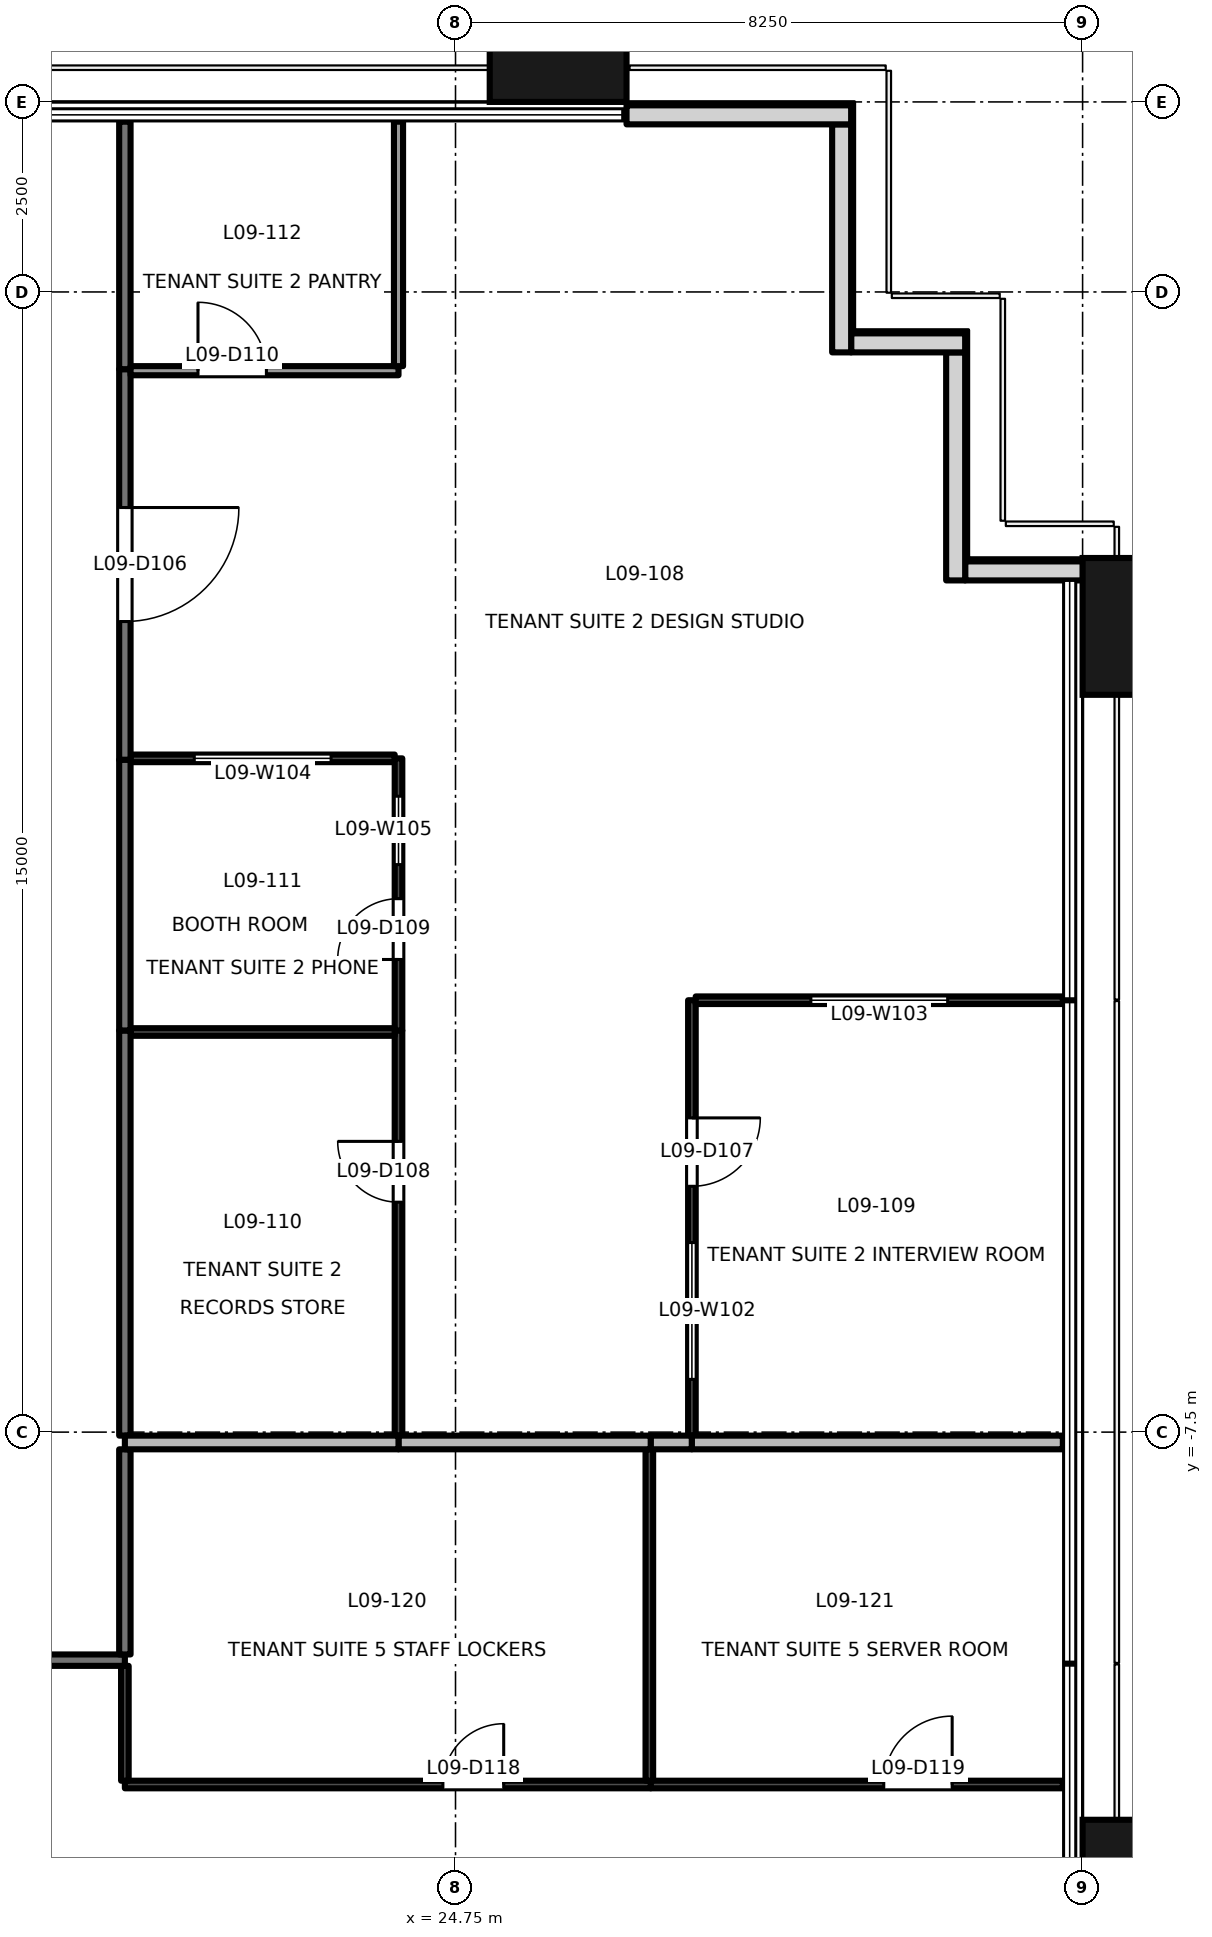
"""IFC4 building model, lengths in metres.
Left out: names, types, materials, properties, quantities, classifications, styles, units other than length and angle.
Written with IfcOpenShell. Run it as: python <this file> out.ifc"""

import sys

from ifc_helpers import new_model, si_unit, direction, frame, frame_2d, origin, origin_2d, place, context, subcontext, project, spatial, rectangle, extrude, element, fill, save


model = new_model("IFC4")
c1 = context("Model", 3, precision=1e-05, world=origin(), true_north=direction((0.0, 1.0)))
c2 = subcontext(c1, "Body", "Model", "MODEL_VIEW")
j1 = project(units=[si_unit("LENGTHUNIT", "METRE"), si_unit("PLANEANGLEUNIT", "RADIAN")], contexts=[c1])
p1 = place(None, origin())
s1 = spatial("IfcSite", under=j1, at=p1, CompositionType="ELEMENT")
p2 = place(p1, origin())
s2 = spatial("IfcBuilding", under=s1, at=p2, CompositionType="ELEMENT")
p3 = place(p2, frame((0.0, 0.0, 44.7)))
s3 = spatial("IfcBuildingStorey", under=s2, at=p3, CompositionType="ELEMENT", Elevation=44.7)
for number, where, z_axis, x_axis in (
    (1, (33.9, -13.5, -0.2), (0.0, 0.0, 1.0), (0.0, 1.0, 0.0)),
    (2, (33.9, 3.1, -0.2), (0.0, 0.0, 1.0), (0.0, 1.0, 0.0)),
    (3, (26.1, 10.9, -0.2), (0.0, 0.0, 1.0), (1.0, 0.0, 0.0)),
):
    element("IfcColumn", number, at=place(p3, frame(where, z_axis=z_axis, x_axis=x_axis)), inside=s3, PredefinedType="COLUMN", context=c2, shape_type="SweptSolid", body=[
        extrude(rectangle(XDim=1.8, YDim=1.8, at=origin_2d()), origin(), (0.0, 0.0, 1.0), 4.1),
    ])
p4 = place(p3, frame((33.005, 3.83, 0.0), z_axis=(0.0, 0.0, 1.0), x_axis=(-1.0, 0.0, 0.0)))
e4 = element("IfcWall", 4, at=p4, inside=s3, PredefinedType="SOLIDWALL", context=c2, shape_type="SweptSolid", body=[
    extrude(rectangle(XDim=1.55, YDim=0.25, at=frame_2d((0.775, 0.0))), origin(), (0.0, 0.0, 1.0), 3.9),
])
p5 = place(p3, frame((31.33, 3.705, 0.0), z_axis=(0.0, 0.0, 1.0), x_axis=(0.0, 1.0, 0.0)))
e5 = element("IfcWall", 5, at=p5, inside=s3, PredefinedType="SOLIDWALL", context=c2, shape_type="SweptSolid", body=[
    extrude(rectangle(XDim=3.0, YDim=0.25, at=frame_2d((1.5, 0.0))), origin(), (0.0, 0.0, 1.0), 3.9),
])
p6 = place(p3, frame((31.455, 6.83, 0.0), z_axis=(0.0, 0.0, 1.0), x_axis=(-1.0, 0.0, 0.0)))
e6 = element("IfcWall", 6, at=p6, inside=s3, PredefinedType="SOLIDWALL", context=c2, shape_type="SweptSolid", body=[
    extrude(rectangle(XDim=1.5, YDim=0.25, at=frame_2d((0.75, 0.0))), origin(), (0.0, 0.0, 1.0), 3.9),
])
p7 = place(p3, frame((29.83, 6.705, 0.0), z_axis=(0.0, 0.0, 1.0), x_axis=(0.0, 1.0, 0.0)))
e7 = element("IfcWall", 7, at=p7, inside=s3, PredefinedType="SOLIDWALL", context=c2, shape_type="SweptSolid", body=[
    extrude(rectangle(XDim=3.0, YDim=0.25, at=frame_2d((1.5, 0.0))), origin(), (0.0, 0.0, 1.0), 3.9),
])
p8 = place(p3, frame((29.955, 9.83, 0.0), z_axis=(0.0, 0.0, 1.0), x_axis=(-1.0, 0.0, 0.0)))
e8 = element("IfcWall", 8, at=p8, inside=s3, PredefinedType="SOLIDWALL", context=c2, shape_type="SweptSolid", body=[
    extrude(rectangle(XDim=2.955, YDim=0.25, at=frame_2d((1.478, 0.0))), origin(), (0.0, 0.0, 1.0), 3.9),
])
p9 = place(p3, frame((20.4, 6.484, 0.0), z_axis=(0.0, 0.0, 1.0), x_axis=(0.0, -1.0, 0.0)))
e9 = element("IfcWall", 9, at=p9, inside=s3, PredefinedType="PARTITIONING", context=c2, shape_type="SweptSolid", body=[
    extrude(rectangle(XDim=5.14, YDim=0.15, at=frame_2d((2.57, 0.0))), origin(), (0.0, 0.0, 1.0), 3.9),
])
p10 = place(p9, frame((1.82, 0.0, 0.0)))
e10 = element("IfcOpeningElement", 10, at=p10, cuts=e9, PredefinedType="OPENING", context=c2, shape_type="SweptSolid", body=[
    extrude(rectangle(XDim=1.5, YDim=2.1, at=frame_2d((0.75, 1.05))), frame((0.0, 0.085, 0.0), z_axis=(0.0, -1.0, 0.0), x_axis=(1.0, 0.0, 0.0)), (0.0, 0.0, 1.0), 0.171),
])
p11 = place(p3, frame((20.4, -2.216, 0.0), z_axis=(0.0, 0.0, 1.0), x_axis=(0.0, -1.0, 0.0)))
e11 = element("IfcWall", 11, at=p11, inside=s3, PredefinedType="PARTITIONING", context=c2, shape_type="SweptSolid", body=[
    extrude(rectangle(XDim=5.33, YDim=0.15, at=frame_2d((2.665, 0.0))), origin(), (0.0, 0.0, 1.0), 3.3),
])
p12 = place(p3, frame((20.4, 1.344, 0.0), z_axis=(0.0, 0.0, 1.0), x_axis=(0.0, -1.0, 0.0)))
e12 = element("IfcWall", 12, at=p12, inside=s3, PredefinedType="PARTITIONING", context=c2, shape_type="SweptSolid", body=[
    extrude(rectangle(XDim=3.56, YDim=0.15, at=frame_2d((1.78, 0.0))), origin(), (0.0, 0.0, 1.0), 3.3),
])
p13 = place(p3, frame((20.4, 9.74, 0.0), z_axis=(0.0, 0.0, 1.0), x_axis=(0.0, -1.0, 0.0)))
e13 = element("IfcWall", 13, at=p13, inside=s3, PredefinedType="PARTITIONING", context=c2, shape_type="SweptSolid", body=[
    extrude(rectangle(XDim=3.256, YDim=0.15, at=frame_2d((1.628, 0.0))), origin(), (0.0, 0.0, 1.0), 3.9),
])
p14 = place(p3, frame((20.4, -10.5, 0.0), z_axis=(0.0, 0.0, 1.0), x_axis=(-1.0, 0.0, 0.0)))
e14 = element("IfcWall", 14, at=p14, inside=s3, PredefinedType="PARTITIONING", context=c2, shape_type="SweptSolid", body=[
    extrude(rectangle(XDim=14.31, YDim=0.15, at=frame_2d((7.155, 0.0))), origin(), (0.0, 0.0, 1.0), 2.5),
])
p15 = place(p14, frame((3.252, 0.0, 0.0)))
e15 = element("IfcOpeningElement", 15, at=p15, cuts=e14, PredefinedType="OPENING", context=c2, shape_type="SweptSolid", body=[
    extrude(rectangle(XDim=1.8, YDim=2.1, at=frame_2d((0.9, 1.05))), frame((0.0, 0.085, 0.0), z_axis=(0.0, -1.0, 0.0), x_axis=(1.0, 0.0, 0.0)), (0.0, 0.0, 1.0), 0.171),
])
p16 = place(p3, frame((20.4, -7.726, 0.0), z_axis=(0.0, 0.0, 1.0), x_axis=(0.0, -1.0, 0.0)))
e16 = element("IfcWall", 16, at=p16, inside=s3, PredefinedType="PARTITIONING", context=c2, shape_type="SweptSolid", body=[
    extrude(rectangle(XDim=2.699, YDim=0.15, at=frame_2d((1.35, 0.0))), origin(), (0.0, 0.0, 1.0), 3.3),
])
p17 = place(p3, frame((27.86, -1.818, 0.0), z_axis=(0.0, 0.0, 1.0), x_axis=(0.0, -1.0, 0.0)))
e17 = element("IfcWall", 17, at=p17, inside=s3, PredefinedType="PARTITIONING", context=c2, shape_type="SweptSolid", body=[
    extrude(rectangle(XDim=5.728, YDim=0.1, at=frame_2d((2.864, 0.0))), origin(), (0.0, 0.0, 1.0), 3.3),
])
p18 = place(p17, frame((1.548, 0.0, 0.0)))
e18 = element("IfcOpeningElement", 18, at=p18, cuts=e17, PredefinedType="OPENING", context=c2, shape_type="SweptSolid", body=[
    extrude(rectangle(XDim=0.9, YDim=2.1, at=frame_2d((0.45, 1.05))), frame((0.0, 0.061, 0.0), z_axis=(0.0, -1.0, 0.0), x_axis=(1.0, 0.0, 0.0)), (0.0, 0.0, 1.0), 0.121),
])
p19 = place(p17, frame((3.188, 0.0, 0.9)))
e19 = element("IfcOpeningElement", 19, at=p19, cuts=e17, PredefinedType="OPENING", context=c2, shape_type="SweptSolid", body=[
    extrude(rectangle(XDim=1.8, YDim=1.2, at=frame_2d((0.9, 0.6))), frame((0.0, 0.061, 0.0), z_axis=(0.0, -1.0, 0.0), x_axis=(1.0, 0.0, 0.0)), (0.0, 0.0, 1.0), 0.121),
])
p20 = place(p3, frame((32.74, -1.818, 0.0), z_axis=(0.0, 0.0, 1.0), x_axis=(-1.0, 0.0, 0.0)))
e20 = element("IfcWall", 20, at=p20, inside=s3, PredefinedType="PARTITIONING", context=c2, shape_type="SweptSolid", body=[
    extrude(rectangle(XDim=4.83, YDim=0.1, at=frame_2d((2.415, 0.0))), origin(), (0.0, 0.0, 1.0), 3.9),
])
p21 = place(p20, frame((1.515, 0.0, 0.9)))
e21 = element("IfcOpeningElement", 21, at=p21, cuts=e20, PredefinedType="OPENING", context=c2, shape_type="SweptSolid", body=[
    extrude(rectangle(XDim=1.8, YDim=1.2, at=frame_2d((0.9, 0.6))), frame((0.0, 0.061, 0.0), z_axis=(0.0, -1.0, 0.0), x_axis=(1.0, 0.0, 0.0)), (0.0, 0.0, 1.0), 0.121),
])
p22 = place(p3, frame((24.0, -7.546, 0.0), z_axis=(0.0, 0.0, 1.0), x_axis=(0.0, 1.0, 0.0)))
e22 = element("IfcWall", 22, at=p22, inside=s3, PredefinedType="PARTITIONING", context=c2, shape_type="SweptSolid", body=[
    extrude(rectangle(XDim=5.33, YDim=0.1, at=frame_2d((2.665, 0.0))), origin(), (0.0, 0.0, 1.0), 3.3),
])
p23 = place(p22, frame((3.071, 0.0, 0.0)))
e23 = element("IfcOpeningElement", 23, at=p23, cuts=e22, PredefinedType="OPENING", context=c2, shape_type="SweptSolid", body=[
    extrude(rectangle(XDim=0.8, YDim=2.1, at=frame_2d((0.4, 1.05))), frame((0.0, 0.061, 0.0), z_axis=(0.0, -1.0, 0.0), x_axis=(1.0, 0.0, 0.0)), (0.0, 0.0, 1.0), 0.121),
])
p24 = place(p3, frame((23.95, 1.364, 0.0), z_axis=(0.0, 0.0, 1.0), x_axis=(-1.0, 0.0, 0.0)))
e24 = element("IfcWall", 24, at=p24, inside=s3, PredefinedType="PARTITIONING", context=c2, shape_type="SweptSolid", body=[
    extrude(rectangle(XDim=3.475, YDim=0.1, at=frame_2d((1.737, 0.0))), origin(), (0.0, 0.0, 1.0), 3.9),
])
p25 = place(p24, frame((0.837, 0.0, 0.9)))
e25 = element("IfcOpeningElement", 25, at=p25, cuts=e24, PredefinedType="OPENING", context=c2, shape_type="SweptSolid", body=[
    extrude(rectangle(XDim=1.8, YDim=1.2, at=frame_2d((0.9, 0.6))), frame((0.0, 0.061, 0.0), z_axis=(0.0, -1.0, 0.0), x_axis=(1.0, 0.0, 0.0)), (0.0, 0.0, 1.0), 0.121),
])
p26 = place(p3, frame((24.0, -2.216, 0.0), z_axis=(0.0, 0.0, 1.0), x_axis=(0.0, 1.0, 0.0)))
e26 = element("IfcWall", 26, at=p26, inside=s3, PredefinedType="PARTITIONING", context=c2, shape_type="SweptSolid", body=[
    extrude(rectangle(XDim=3.58, YDim=0.1, at=frame_2d((1.79, 0.0))), origin(), (0.0, 0.0, 1.0), 3.3),
])
p27 = place(p26, frame((0.934, 0.0, 0.0)))
e27 = element("IfcOpeningElement", 27, at=p27, cuts=e26, PredefinedType="OPENING", context=c2, shape_type="SweptSolid", body=[
    extrude(rectangle(XDim=0.8, YDim=2.1, at=frame_2d((0.4, 1.05))), frame((0.0, 0.061, 0.0), z_axis=(0.0, -1.0, 0.0), x_axis=(1.0, 0.0, 0.0)), (0.0, 0.0, 1.0), 0.121),
])
p28 = place(p26, frame((2.182, 0.0, 0.9)))
e28 = element("IfcOpeningElement", 28, at=p28, cuts=e26, PredefinedType="OPENING", context=c2, shape_type="SweptSolid", body=[
    extrude(rectangle(XDim=0.9, YDim=1.2, at=frame_2d((0.45, 0.6))), frame((0.0, 0.061, 0.0), z_axis=(0.0, -1.0, 0.0), x_axis=(1.0, 0.0, 0.0)), (0.0, 0.0, 1.0), 0.121),
])
p29 = place(p3, frame((20.475, 6.464, 0.0), z_axis=(0.0, 0.0, 1.0), x_axis=(1.0, 0.0, 0.0)))
e29 = element("IfcWall", 29, at=p29, inside=s3, PredefinedType="PARTITIONING", context=c2, shape_type="SweptSolid", body=[
    extrude(rectangle(XDim=3.525, YDim=0.12, at=frame_2d((1.762, 0.0))), origin(), (0.0, 0.0, 1.0), 3.9),
])
p30 = place(p29, frame((0.887, 0.0, 0.0)))
e30 = element("IfcOpeningElement", 30, at=p30, cuts=e29, PredefinedType="OPENING", context=c2, shape_type="SweptSolid", body=[
    extrude(rectangle(XDim=0.9, YDim=2.1, at=frame_2d((0.45, 1.05))), frame((0.0, 0.071, 0.0), z_axis=(0.0, -1.0, 0.0), x_axis=(1.0, 0.0, 0.0)), (0.0, 0.0, 1.0), 0.141),
])
p31 = place(p3, frame((24.0, 6.524, 0.0), z_axis=(0.0, 0.0, 1.0), x_axis=(0.0, 1.0, 0.0)))
e31 = element("IfcWall", 31, at=p31, inside=s3, PredefinedType="PARTITIONING", context=c2, shape_type="SweptSolid", body=[
    extrude(rectangle(XDim=3.216, YDim=0.12, at=frame_2d((1.608, 0.0))), origin(), (0.0, 0.0, 1.0), 3.9),
])
p32 = place(p3, frame((27.32, -7.636, 0.0), z_axis=(0.0, 0.0, 1.0), x_axis=(-1.0, 0.0, 0.0)))
e32 = element("IfcWall", 32, at=p32, inside=s3, PredefinedType="PARTITIONING", context=c2, shape_type="SweptSolid", body=[
    extrude(rectangle(XDim=3.32, YDim=0.18, at=frame_2d((1.66, 0.0))), origin(), (0.0, 0.0, 1.0), 3.9),
])
p33 = place(p3, frame((27.86, -7.636, 0.0), z_axis=(0.0, 0.0, 1.0), x_axis=(-1.0, 0.0, 0.0)))
e33 = element("IfcWall", 33, at=p33, inside=s3, PredefinedType="PARTITIONING", context=c2, shape_type="SweptSolid", body=[
    extrude(rectangle(XDim=0.54, YDim=0.18, at=frame_2d((0.27, 0.0))), origin(), (0.0, 0.0, 1.0), 3.9),
])
p34 = place(p3, frame((32.74, -7.636, 0.0), z_axis=(0.0, 0.0, 1.0), x_axis=(-1.0, 0.0, 0.0)))
e34 = element("IfcWall", 34, at=p34, inside=s3, PredefinedType="PARTITIONING", context=c2, shape_type="SweptSolid", body=[
    extrude(rectangle(XDim=4.88, YDim=0.18, at=frame_2d((2.44, 0.0))), origin(), (0.0, 0.0, 1.0), 3.9),
])
p35 = place(p3, frame((20.475, -2.236, 0.0), z_axis=(0.0, 0.0, 1.0), x_axis=(1.0, 0.0, 0.0)))
e35 = element("IfcWall", 35, at=p35, inside=s3, PredefinedType="PARTITIONING", context=c2, shape_type="SweptSolid", body=[
    extrude(rectangle(XDim=3.475, YDim=0.1, at=frame_2d((1.737, 0.0))), origin(), (0.0, 0.0, 1.0), 3.9),
])
p36 = place(p3, frame((24.0, -7.636, 0.0), z_axis=(0.0, 0.0, 1.0), x_axis=(-1.0, 0.0, 0.0)))
e36 = element("IfcWall", 36, at=p36, inside=s3, PredefinedType="PARTITIONING", context=c2, shape_type="SweptSolid", body=[
    extrude(rectangle(XDim=3.6, YDim=0.18, at=frame_2d((1.8, 0.0))), origin(), (0.0, 0.0, 1.0), 3.9),
])
p37 = place(p3, frame((20.4, -12.136, 0.0), z_axis=(0.0, 0.0, 1.0), x_axis=(1.0, 0.0, 0.0)))
e37 = element("IfcWall", 37, at=p37, inside=s3, PredefinedType="PARTITIONING", context=c2, shape_type="SweptSolid", body=[
    extrude(rectangle(XDim=6.92, YDim=0.1, at=frame_2d((3.46, 0.0))), origin(), (0.0, 0.0, 1.0), 3.9),
])
p38 = place(p37, frame((4.184, 0.0, 0.0)))
e38 = element("IfcOpeningElement", 38, at=p38, cuts=e37, PredefinedType="OPENING", context=c2, shape_type="SweptSolid", body=[
    extrude(rectangle(XDim=0.8, YDim=2.1, at=frame_2d((0.4, 1.05))), frame((0.0, 0.061, 0.0), z_axis=(0.0, -1.0, 0.0), x_axis=(1.0, 0.0, 0.0)), (0.0, 0.0, 1.0), 0.121),
])
p39 = place(p3, frame((20.4, -10.575, 0.0), z_axis=(0.0, 0.0, 1.0), x_axis=(0.0, -1.0, 0.0)))
e39 = element("IfcWall", 39, at=p39, inside=s3, PredefinedType="PARTITIONING", context=c2, shape_type="SweptSolid", body=[
    extrude(rectangle(XDim=1.511, YDim=0.1, at=frame_2d((0.755, 0.0))), origin(), (0.0, 0.0, 1.0), 3.9),
])
p40 = place(p3, frame((27.32, -12.136, 0.0), z_axis=(0.0, 0.0, 1.0), x_axis=(1.0, 0.0, 0.0)))
e40 = element("IfcWall", 40, at=p40, inside=s3, PredefinedType="PARTITIONING", context=c2, shape_type="SweptSolid", body=[
    extrude(rectangle(XDim=5.42, YDim=0.1, at=frame_2d((2.71, 0.0))), origin(), (0.0, 0.0, 1.0), 3.9),
])
p41 = place(p40, frame((3.064, 0.0, 0.0)))
e41 = element("IfcOpeningElement", 41, at=p41, cuts=e40, PredefinedType="OPENING", context=c2, shape_type="SweptSolid", body=[
    extrude(rectangle(XDim=0.9, YDim=2.1, at=frame_2d((0.45, 1.05))), frame((0.0, 0.061, 0.0), z_axis=(0.0, -1.0, 0.0), x_axis=(1.0, 0.0, 0.0)), (0.0, 0.0, 1.0), 0.121),
])
p42 = place(p3, frame((27.3, -7.726, 0.0), z_axis=(0.0, 0.0, 1.0), x_axis=(0.0, -1.0, 0.0)))
e42 = element("IfcWall", 42, at=p42, inside=s3, PredefinedType="PARTITIONING", context=c2, shape_type="SweptSolid", body=[
    extrude(rectangle(XDim=4.36, YDim=0.1, at=frame_2d((2.18, 0.0))), origin(), (0.0, 0.0, 1.0), 3.3),
])
p43 = place(p10, origin())
e43 = element("IfcDoor", 43, at=p43, inside=s3, OperationType="DOUBLE_DOOR_SINGLE_SWING", PredefinedType="DOOR", context=c2, shape_type="SweptSolid", body=[
    extrude(rectangle(XDim=1.5, YDim=2.1, at=frame_2d((0.75, 1.05))), frame((0.0, 0.025, 0.0), z_axis=(0.0, -1.0, 0.0), x_axis=(1.0, 0.0, 0.0)), (0.0, 0.0, 1.0), 0.05),
])
fill(e10, e43)
p44 = place(p18, origin())
e44 = element("IfcDoor", 44, at=p44, inside=s3, OperationType="SINGLE_SWING_LEFT", PredefinedType="DOOR", context=c2, shape_type="SweptSolid", body=[
    extrude(rectangle(XDim=0.9, YDim=2.1, at=frame_2d((0.45, 1.05))), frame((0.0, 0.025, 0.0), z_axis=(0.0, -1.0, 0.0), x_axis=(1.0, 0.0, 0.0)), (0.0, 0.0, 1.0), 0.05),
])
fill(e18, e44)
p45 = place(p23, origin())
e45 = element("IfcDoor", 45, at=p45, inside=s3, OperationType="SINGLE_SWING_RIGHT", PredefinedType="DOOR", context=c2, shape_type="SweptSolid", body=[
    extrude(rectangle(XDim=0.8, YDim=2.1, at=frame_2d((0.4, 1.05))), frame((0.0, 0.025, 0.0), z_axis=(0.0, -1.0, 0.0), x_axis=(1.0, 0.0, 0.0)), (0.0, 0.0, 1.0), 0.05),
])
fill(e23, e45)
p46 = place(p27, origin())
e46 = element("IfcDoor", 46, at=p46, inside=s3, OperationType="SINGLE_SWING_LEFT", PredefinedType="DOOR", context=c2, shape_type="SweptSolid", body=[
    extrude(rectangle(XDim=0.8, YDim=2.1, at=frame_2d((0.4, 1.05))), frame((0.0, 0.025, 0.0), z_axis=(0.0, -1.0, 0.0), x_axis=(1.0, 0.0, 0.0)), (0.0, 0.0, 1.0), 0.05),
])
fill(e27, e46)
p47 = place(p30, origin())
e47 = element("IfcDoor", 47, at=p47, inside=s3, OperationType="SINGLE_SWING_LEFT", PredefinedType="DOOR", context=c2, shape_type="SweptSolid", body=[
    extrude(rectangle(XDim=0.9, YDim=2.1, at=frame_2d((0.45, 1.05))), frame((0.0, 0.025, 0.0), z_axis=(0.0, -1.0, 0.0), x_axis=(1.0, 0.0, 0.0)), (0.0, 0.0, 1.0), 0.05),
])
fill(e30, e47)
p48 = place(p38, origin())
e48 = element("IfcDoor", 48, at=p48, inside=s3, OperationType="SINGLE_SWING_RIGHT", PredefinedType="DOOR", context=c2, shape_type="SweptSolid", body=[
    extrude(rectangle(XDim=0.8, YDim=2.1, at=frame_2d((0.4, 1.05))), frame((0.0, 0.025, 0.0), z_axis=(0.0, -1.0, 0.0), x_axis=(1.0, 0.0, 0.0)), (0.0, 0.0, 1.0), 0.05),
])
fill(e38, e48)
p49 = place(p41, origin())
e49 = element("IfcDoor", 49, at=p49, inside=s3, OperationType="SINGLE_SWING_RIGHT", PredefinedType="DOOR", context=c2, shape_type="SweptSolid", body=[
    extrude(rectangle(XDim=0.9, YDim=2.1, at=frame_2d((0.45, 1.05))), frame((0.0, 0.025, 0.0), z_axis=(0.0, -1.0, 0.0), x_axis=(1.0, 0.0, 0.0)), (0.0, 0.0, 1.0), 0.05),
])
fill(e41, e49)
p50 = place(p19, origin())
e50 = element("IfcWindow", 50, at=p50, inside=s3, PartitioningType="SINGLE_PANEL", PredefinedType="WINDOW", context=c2, shape_type="SweptSolid", body=[
    extrude(rectangle(XDim=1.8, YDim=1.2, at=frame_2d((0.9, 0.6))), frame((0.0, 0.03, 0.0), z_axis=(0.0, -1.0, 0.0), x_axis=(1.0, 0.0, 0.0)), (0.0, 0.0, 1.0), 0.06),
])
fill(e19, e50)
p51 = place(p21, origin())
e51 = element("IfcWindow", 51, at=p51, inside=s3, PartitioningType="SINGLE_PANEL", PredefinedType="WINDOW", context=c2, shape_type="SweptSolid", body=[
    extrude(rectangle(XDim=1.8, YDim=1.2, at=frame_2d((0.9, 0.6))), frame((0.0, 0.03, 0.0), z_axis=(0.0, -1.0, 0.0), x_axis=(1.0, 0.0, 0.0)), (0.0, 0.0, 1.0), 0.06),
])
fill(e21, e51)
p52 = place(p25, origin())
e52 = element("IfcWindow", 52, at=p52, inside=s3, PartitioningType="SINGLE_PANEL", PredefinedType="WINDOW", context=c2, shape_type="SweptSolid", body=[
    extrude(rectangle(XDim=1.8, YDim=1.2, at=frame_2d((0.9, 0.6))), frame((0.0, 0.03, 0.0), z_axis=(0.0, -1.0, 0.0), x_axis=(1.0, 0.0, 0.0)), (0.0, 0.0, 1.0), 0.06),
])
fill(e25, e52)
p53 = place(p28, origin())
e53 = element("IfcWindow", 53, at=p53, inside=s3, PartitioningType="SINGLE_PANEL", PredefinedType="WINDOW", context=c2, shape_type="SweptSolid", body=[
    extrude(rectangle(XDim=0.9, YDim=1.2, at=frame_2d((0.45, 0.6))), frame((0.0, 0.03, 0.0), z_axis=(0.0, -1.0, 0.0), x_axis=(1.0, 0.0, 0.0)), (0.0, 0.0, 1.0), 0.06),
])
fill(e28, e53)
save(model, sys.argv[1])
